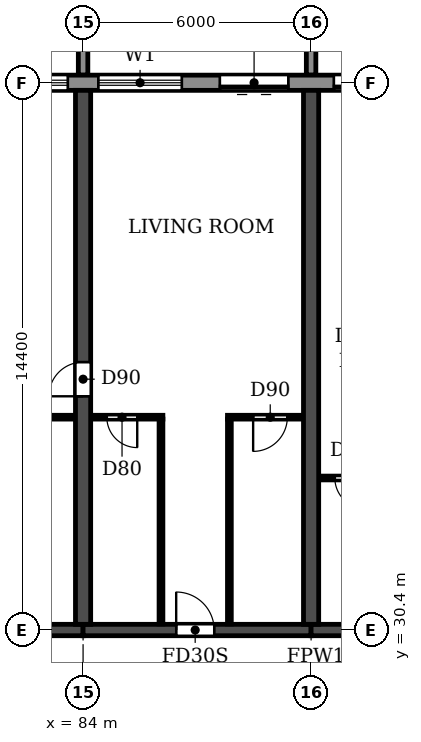
"""IFC4 building model, lengths in metres.
Left out: names, types, materials, properties, quantities, classifications, styles, units other than length and angle.
Written with IfcOpenShell. Run it as: python <this file> out.ifc"""

import sys

from ifc_helpers import new_model, si_unit, direction, frame, frame_2d, origin, place, context, subcontext, project, spatial, polyline, rectangle, outline, extrude, source, transform, mapped, element, fill, save


model = new_model("IFC4")
c1 = context("Model", 3, precision=1e-05, world=origin(), true_north=direction((0.0, 1.0)))
c2 = subcontext(c1, "Body", "Model", "MODEL_VIEW")
j1 = project(units=[si_unit("LENGTHUNIT", "METRE"), si_unit("PLANEANGLEUNIT", "RADIAN")], contexts=[c1])
p1 = place(None, origin())
s1 = spatial("IfcSite", under=j1, at=p1, CompositionType="ELEMENT")
p2 = place(p1, origin())
s2 = spatial("IfcBuilding", under=s1, at=p2, CompositionType="ELEMENT")
p3 = place(p2, frame((0.0, 0.0, 26.7)))
s3 = spatial("IfcBuildingStorey", under=s2, at=p3, CompositionType="ELEMENT", Elevation=26.7)
p4 = place(p3, frame((84.0, 30.55, 0.0), z_axis=(0.0, 0.0, 1.0), x_axis=(0.0, 1.0, 0.0)))
e1 = element("IfcWall", 1, at=p4, inside=s3, PredefinedType="SHEAR", context=c2, shape_type="SweptSolid", body=[
    extrude(rectangle(XDim=14.05, YDim=0.4, at=frame_2d((7.025, 0.0))), origin(), (0.0, 0.0, 1.0), 3.05),
])
p5 = place(p4, frame((6.0, 0.0, 0.0)))
e2 = element("IfcOpeningElement", 2, at=p5, cuts=e1, PredefinedType="OPENING", context=c2, shape_type="SweptSolid", body=[
    extrude(rectangle(XDim=0.9, YDim=2.1, at=frame_2d((0.45, 1.05))), frame((0.0, 0.21, 0.0), z_axis=(0.0, -1.0, 0.0), x_axis=(1.0, 0.0, 0.0)), (0.0, 0.0, 1.0), 0.42),
])
p6 = place(p3, frame((90.0, 30.55, 0.0), z_axis=(0.0, 0.0, 1.0), x_axis=(0.0, 1.0, 0.0)))
e3 = element("IfcWall", 3, at=p6, inside=s3, PredefinedType="SHEAR", context=c2, shape_type="SweptSolid", body=[
    extrude(rectangle(XDim=14.05, YDim=0.4, at=frame_2d((7.025, 0.0))), origin(), (0.0, 0.0, 1.0), 3.05),
])
p7 = place(p3, frame((78.0, 30.4, 0.0), z_axis=(0.0, 0.0, 1.0), x_axis=(1.0, 0.0, 0.0)))
e4 = element("IfcWall", 4, at=p7, inside=s3, PredefinedType="SHEAR", context=c2, shape_type="SweptSolid", body=[
    extrude(rectangle(XDim=6.0, YDim=0.3, at=frame_2d((3.0, 0.0))), origin(), (0.0, 0.0, 1.0), 2.45),
])
p8 = place(p3, frame((84.0, 30.4, 0.0), z_axis=(0.0, 0.0, 1.0), x_axis=(1.0, 0.0, 0.0)))
e5 = element("IfcWall", 5, at=p8, inside=s3, PredefinedType="SHEAR", context=c2, shape_type="SweptSolid", body=[
    extrude(rectangle(XDim=6.0, YDim=0.3, at=frame_2d((3.0, 0.0))), origin(), (0.0, 0.0, 1.0), 2.45),
])
p9 = place(p8, frame((2.45, 0.0, 0.0)))
e6 = element("IfcOpeningElement", 6, at=p9, cuts=e5, PredefinedType="OPENING", context=c2, shape_type="SweptSolid", body=[
    extrude(rectangle(XDim=1.0, YDim=2.1, at=frame_2d((0.5, 1.05))), frame((0.0, 0.16, 0.0), z_axis=(0.0, -1.0, 0.0), x_axis=(1.0, 0.0, 0.0)), (0.0, 0.0, 1.0), 0.32),
])
p10 = place(p3, frame((90.0, 30.4, 0.0), z_axis=(0.0, 0.0, 1.0), x_axis=(1.0, 0.0, 0.0)))
e7 = element("IfcWall", 7, at=p10, inside=s3, PredefinedType="SHEAR", context=c2, shape_type="SweptSolid", body=[
    extrude(rectangle(XDim=6.0, YDim=0.3, at=frame_2d((3.0, 0.0))), origin(), (0.0, 0.0, 1.0), 2.45),
])
p11 = place(p10, frame((2.45, 0.0, 0.0)))
e8 = element("IfcOpeningElement", 8, at=p11, cuts=e7, PredefinedType="OPENING", context=c2, shape_type="SweptSolid", body=[
    extrude(rectangle(XDim=1.0, YDim=2.1, at=frame_2d((0.5, 1.05))), frame((0.0, 0.16, 0.0), z_axis=(0.0, -1.0, 0.0), x_axis=(1.0, 0.0, 0.0)), (0.0, 0.0, 1.0), 0.32),
])
p12 = place(p3, frame((97.317, 44.8, 0.0), z_axis=(0.0, 0.0, 1.0), x_axis=(-1.0, 0.0, 0.0)))
e9 = element("IfcWall", 9, at=p12, inside=s3, PredefinedType="STANDARD", context=c2, shape_type="SweptSolid", body=[
    extrude(rectangle(XDim=92.634, YDim=0.4, at=frame_2d((46.317, 0.0))), origin(), (0.0, 0.0, 1.0), 3.05),
])
p13 = place(p12, frame((88.717, 0.0, 0.9)))
e10 = element("IfcOpeningElement", 10, at=p13, cuts=e9, PredefinedType="OPENING", context=c2, shape_type="SweptSolid", body=[
    extrude(rectangle(XDim=2.2, YDim=1.5, at=frame_2d((1.1, 0.75))), frame((0.0, 0.21, 0.0), z_axis=(0.0, -1.0, 0.0), x_axis=(1.0, 0.0, 0.0)), (0.0, 0.0, 1.0), 0.42),
])
p14 = place(p12, frame((85.917, 0.0, 0.0)))
e11 = element("IfcOpeningElement", 11, at=p14, cuts=e9, PredefinedType="OPENING", context=c2, shape_type="SweptSolid", body=[
    extrude(rectangle(XDim=1.8, YDim=2.4, at=frame_2d((0.9, 1.2))), frame((0.0, 0.21, 0.0), z_axis=(0.0, -1.0, 0.0), x_axis=(1.0, 0.0, 0.0)), (0.0, 0.0, 1.0), 0.42),
])
p15 = place(p12, frame((82.717, 0.0, 0.9)))
e12 = element("IfcOpeningElement", 12, at=p15, cuts=e9, PredefinedType="OPENING", context=c2, shape_type="SweptSolid", body=[
    extrude(rectangle(XDim=2.2, YDim=1.5, at=frame_2d((1.1, 0.75))), frame((0.0, 0.21, 0.0), z_axis=(0.0, -1.0, 0.0), x_axis=(1.0, 0.0, 0.0)), (0.0, 0.0, 1.0), 0.42),
])
p16 = place(p12, frame((79.717, 0.0, 0.9)))
e13 = element("IfcOpeningElement", 13, at=p16, cuts=e9, PredefinedType="OPENING", context=c2, shape_type="SweptSolid", body=[
    extrude(rectangle(XDim=2.2, YDim=1.5, at=frame_2d((1.1, 0.75))), frame((0.0, 0.21, 0.0), z_axis=(0.0, -1.0, 0.0), x_axis=(1.0, 0.0, 0.0)), (0.0, 0.0, 1.0), 0.42),
])
p17 = place(p12, frame((76.917, 0.0, 0.0)))
e14 = element("IfcOpeningElement", 14, at=p17, cuts=e9, PredefinedType="OPENING", context=c2, shape_type="SweptSolid", body=[
    extrude(rectangle(XDim=1.8, YDim=2.4, at=frame_2d((0.9, 1.2))), frame((0.0, 0.21, 0.0), z_axis=(0.0, -1.0, 0.0), x_axis=(1.0, 0.0, 0.0)), (0.0, 0.0, 1.0), 0.42),
])
p18 = place(p12, frame((73.717, 0.0, 0.9)))
e15 = element("IfcOpeningElement", 15, at=p18, cuts=e9, PredefinedType="OPENING", context=c2, shape_type="SweptSolid", body=[
    extrude(rectangle(XDim=2.2, YDim=1.5, at=frame_2d((1.1, 0.75))), frame((0.0, 0.21, 0.0), z_axis=(0.0, -1.0, 0.0), x_axis=(1.0, 0.0, 0.0)), (0.0, 0.0, 1.0), 0.42),
])
p19 = place(p12, frame((70.717, 0.0, 0.9)))
e16 = element("IfcOpeningElement", 16, at=p19, cuts=e9, PredefinedType="OPENING", context=c2, shape_type="SweptSolid", body=[
    extrude(rectangle(XDim=2.2, YDim=1.5, at=frame_2d((1.1, 0.75))), frame((0.0, 0.21, 0.0), z_axis=(0.0, -1.0, 0.0), x_axis=(1.0, 0.0, 0.0)), (0.0, 0.0, 1.0), 0.42),
])
p20 = place(p12, frame((67.717, 0.0, 0.9)))
e17 = element("IfcOpeningElement", 17, at=p20, cuts=e9, PredefinedType="OPENING", context=c2, shape_type="SweptSolid", body=[
    extrude(rectangle(XDim=2.2, YDim=1.5, at=frame_2d((1.1, 0.75))), frame((0.0, 0.21, 0.0), z_axis=(0.0, -1.0, 0.0), x_axis=(1.0, 0.0, 0.0)), (0.0, 0.0, 1.0), 0.42),
])
p21 = place(p12, frame((64.917, 0.0, 0.0)))
e18 = element("IfcOpeningElement", 18, at=p21, cuts=e9, PredefinedType="OPENING", context=c2, shape_type="SweptSolid", body=[
    extrude(rectangle(XDim=1.8, YDim=2.4, at=frame_2d((0.9, 1.2))), frame((0.0, 0.21, 0.0), z_axis=(0.0, -1.0, 0.0), x_axis=(1.0, 0.0, 0.0)), (0.0, 0.0, 1.0), 0.42),
])
p22 = place(p12, frame((61.717, 0.0, 0.9)))
e19 = element("IfcOpeningElement", 19, at=p22, cuts=e9, PredefinedType="OPENING", context=c2, shape_type="SweptSolid", body=[
    extrude(rectangle(XDim=2.2, YDim=1.5, at=frame_2d((1.1, 0.75))), frame((0.0, 0.21, 0.0), z_axis=(0.0, -1.0, 0.0), x_axis=(1.0, 0.0, 0.0)), (0.0, 0.0, 1.0), 0.42),
])
p23 = place(p12, frame((58.717, 0.0, 0.9)))
e20 = element("IfcOpeningElement", 20, at=p23, cuts=e9, PredefinedType="OPENING", context=c2, shape_type="SweptSolid", body=[
    extrude(rectangle(XDim=2.2, YDim=1.5, at=frame_2d((1.1, 0.75))), frame((0.0, 0.21, 0.0), z_axis=(0.0, -1.0, 0.0), x_axis=(1.0, 0.0, 0.0)), (0.0, 0.0, 1.0), 0.42),
])
p24 = place(p12, frame((55.917, 0.0, 0.0)))
e21 = element("IfcOpeningElement", 21, at=p24, cuts=e9, PredefinedType="OPENING", context=c2, shape_type="SweptSolid", body=[
    extrude(rectangle(XDim=1.8, YDim=2.4, at=frame_2d((0.9, 1.2))), frame((0.0, 0.21, 0.0), z_axis=(0.0, -1.0, 0.0), x_axis=(1.0, 0.0, 0.0)), (0.0, 0.0, 1.0), 0.42),
])
p25 = place(p12, frame((52.917, 0.0, 0.0)))
e22 = element("IfcOpeningElement", 22, at=p25, cuts=e9, PredefinedType="OPENING", context=c2, shape_type="SweptSolid", body=[
    extrude(rectangle(XDim=1.8, YDim=2.4, at=frame_2d((0.9, 1.2))), frame((0.0, 0.21, 0.0), z_axis=(0.0, -1.0, 0.0), x_axis=(1.0, 0.0, 0.0)), (0.0, 0.0, 1.0), 0.42),
])
p26 = place(p12, frame((49.717, 0.0, 0.9)))
e23 = element("IfcOpeningElement", 23, at=p26, cuts=e9, PredefinedType="OPENING", context=c2, shape_type="SweptSolid", body=[
    extrude(rectangle(XDim=2.2, YDim=1.5, at=frame_2d((1.1, 0.75))), frame((0.0, 0.21, 0.0), z_axis=(0.0, -1.0, 0.0), x_axis=(1.0, 0.0, 0.0)), (0.0, 0.0, 1.0), 0.42),
])
p27 = place(p12, frame((46.917, 0.0, 0.0)))
e24 = element("IfcOpeningElement", 24, at=p27, cuts=e9, PredefinedType="OPENING", context=c2, shape_type="SweptSolid", body=[
    extrude(rectangle(XDim=1.8, YDim=2.4, at=frame_2d((0.9, 1.2))), frame((0.0, 0.21, 0.0), z_axis=(0.0, -1.0, 0.0), x_axis=(1.0, 0.0, 0.0)), (0.0, 0.0, 1.0), 0.42),
])
p28 = place(p12, frame((43.717, 0.0, 0.9)))
e25 = element("IfcOpeningElement", 25, at=p28, cuts=e9, PredefinedType="OPENING", context=c2, shape_type="SweptSolid", body=[
    extrude(rectangle(XDim=2.2, YDim=1.5, at=frame_2d((1.1, 0.75))), frame((0.0, 0.21, 0.0), z_axis=(0.0, -1.0, 0.0), x_axis=(1.0, 0.0, 0.0)), (0.0, 0.0, 1.0), 0.42),
])
p29 = place(p12, frame((40.717, 0.0, 0.9)))
e26 = element("IfcOpeningElement", 26, at=p29, cuts=e9, PredefinedType="OPENING", context=c2, shape_type="SweptSolid", body=[
    extrude(rectangle(XDim=2.2, YDim=1.5, at=frame_2d((1.1, 0.75))), frame((0.0, 0.21, 0.0), z_axis=(0.0, -1.0, 0.0), x_axis=(1.0, 0.0, 0.0)), (0.0, 0.0, 1.0), 0.42),
])
p30 = place(p12, frame((37.917, 0.0, 0.0)))
e27 = element("IfcOpeningElement", 27, at=p30, cuts=e9, PredefinedType="OPENING", context=c2, shape_type="SweptSolid", body=[
    extrude(rectangle(XDim=1.8, YDim=2.4, at=frame_2d((0.9, 1.2))), frame((0.0, 0.21, 0.0), z_axis=(0.0, -1.0, 0.0), x_axis=(1.0, 0.0, 0.0)), (0.0, 0.0, 1.0), 0.42),
])
p31 = place(p12, frame((34.917, 0.0, 0.0)))
e28 = element("IfcOpeningElement", 28, at=p31, cuts=e9, PredefinedType="OPENING", context=c2, shape_type="SweptSolid", body=[
    extrude(rectangle(XDim=1.8, YDim=2.4, at=frame_2d((0.9, 1.2))), frame((0.0, 0.21, 0.0), z_axis=(0.0, -1.0, 0.0), x_axis=(1.0, 0.0, 0.0)), (0.0, 0.0, 1.0), 0.42),
])
p32 = place(p12, frame((31.717, 0.0, 0.9)))
e29 = element("IfcOpeningElement", 29, at=p32, cuts=e9, PredefinedType="OPENING", context=c2, shape_type="SweptSolid", body=[
    extrude(rectangle(XDim=2.2, YDim=1.5, at=frame_2d((1.1, 0.75))), frame((0.0, 0.21, 0.0), z_axis=(0.0, -1.0, 0.0), x_axis=(1.0, 0.0, 0.0)), (0.0, 0.0, 1.0), 0.42),
])
p33 = place(p12, frame((28.717, 0.0, 0.9)))
e30 = element("IfcOpeningElement", 30, at=p33, cuts=e9, PredefinedType="OPENING", context=c2, shape_type="SweptSolid", body=[
    extrude(rectangle(XDim=2.2, YDim=1.5, at=frame_2d((1.1, 0.75))), frame((0.0, 0.21, 0.0), z_axis=(0.0, -1.0, 0.0), x_axis=(1.0, 0.0, 0.0)), (0.0, 0.0, 1.0), 0.42),
])
p34 = place(p12, frame((25.717, 0.0, 0.9)))
e31 = element("IfcOpeningElement", 31, at=p34, cuts=e9, PredefinedType="OPENING", context=c2, shape_type="SweptSolid", body=[
    extrude(rectangle(XDim=2.2, YDim=1.5, at=frame_2d((1.1, 0.75))), frame((0.0, 0.21, 0.0), z_axis=(0.0, -1.0, 0.0), x_axis=(1.0, 0.0, 0.0)), (0.0, 0.0, 1.0), 0.42),
])
p35 = place(p12, frame((22.717, 0.0, 0.9)))
e32 = element("IfcOpeningElement", 32, at=p35, cuts=e9, PredefinedType="OPENING", context=c2, shape_type="SweptSolid", body=[
    extrude(rectangle(XDim=2.2, YDim=1.5, at=frame_2d((1.1, 0.75))), frame((0.0, 0.21, 0.0), z_axis=(0.0, -1.0, 0.0), x_axis=(1.0, 0.0, 0.0)), (0.0, 0.0, 1.0), 0.42),
])
p36 = place(p12, frame((19.917, 0.0, 0.0)))
e33 = element("IfcOpeningElement", 33, at=p36, cuts=e9, PredefinedType="OPENING", context=c2, shape_type="SweptSolid", body=[
    extrude(rectangle(XDim=1.8, YDim=2.4, at=frame_2d((0.9, 1.2))), frame((0.0, 0.21, 0.0), z_axis=(0.0, -1.0, 0.0), x_axis=(1.0, 0.0, 0.0)), (0.0, 0.0, 1.0), 0.42),
])
p37 = place(p12, frame((16.717, 0.0, 0.9)))
e34 = element("IfcOpeningElement", 34, at=p37, cuts=e9, PredefinedType="OPENING", context=c2, shape_type="SweptSolid", body=[
    extrude(rectangle(XDim=2.2, YDim=1.5, at=frame_2d((1.1, 0.75))), frame((0.0, 0.21, 0.0), z_axis=(0.0, -1.0, 0.0), x_axis=(1.0, 0.0, 0.0)), (0.0, 0.0, 1.0), 0.42),
])
p38 = place(p12, frame((13.717, 0.0, 0.9)))
e35 = element("IfcOpeningElement", 35, at=p38, cuts=e9, PredefinedType="OPENING", context=c2, shape_type="SweptSolid", body=[
    extrude(rectangle(XDim=2.2, YDim=1.5, at=frame_2d((1.1, 0.75))), frame((0.0, 0.21, 0.0), z_axis=(0.0, -1.0, 0.0), x_axis=(1.0, 0.0, 0.0)), (0.0, 0.0, 1.0), 0.42),
])
p39 = place(p12, frame((10.717, 0.0, 0.9)))
e36 = element("IfcOpeningElement", 36, at=p39, cuts=e9, PredefinedType="OPENING", context=c2, shape_type="SweptSolid", body=[
    extrude(rectangle(XDim=2.2, YDim=1.5, at=frame_2d((1.1, 0.75))), frame((0.0, 0.21, 0.0), z_axis=(0.0, -1.0, 0.0), x_axis=(1.0, 0.0, 0.0)), (0.0, 0.0, 1.0), 0.42),
])
p40 = place(p12, frame((7.917, 0.0, 0.0)))
e37 = element("IfcOpeningElement", 37, at=p40, cuts=e9, PredefinedType="OPENING", context=c2, shape_type="SweptSolid", body=[
    extrude(rectangle(XDim=1.8, YDim=2.4, at=frame_2d((0.9, 1.2))), frame((0.0, 0.21, 0.0), z_axis=(0.0, -1.0, 0.0), x_axis=(1.0, 0.0, 0.0)), (0.0, 0.0, 1.0), 0.42),
])
p41 = place(p12, frame((4.917, 0.0, 0.0)))
e38 = element("IfcOpeningElement", 38, at=p41, cuts=e9, PredefinedType="OPENING", context=c2, shape_type="SweptSolid", body=[
    extrude(rectangle(XDim=1.8, YDim=2.4, at=frame_2d((0.9, 1.2))), frame((0.0, 0.21, 0.0), z_axis=(0.0, -1.0, 0.0), x_axis=(1.0, 0.0, 0.0)), (0.0, 0.0, 1.0), 0.42),
])
p42 = place(p12, frame((1.717, 0.0, 0.9)))
e39 = element("IfcOpeningElement", 39, at=p42, cuts=e9, PredefinedType="OPENING", context=c2, shape_type="SweptSolid", body=[
    extrude(rectangle(XDim=2.2, YDim=1.5, at=frame_2d((1.1, 0.75))), frame((0.0, 0.21, 0.0), z_axis=(0.0, -1.0, 0.0), x_axis=(1.0, 0.0, 0.0)), (0.0, 0.0, 1.0), 0.42),
])
m1 = source(origin(), c2, "Body", "SweptSolid", [
    extrude(outline(polyline([(0.0, 0.0), (0.25, 0.0), (0.25, 3.1), (0.0, 3.1), (0.0, 0.0)])), origin(), (0.0, 0.0, 1.0), 3.1),
])
for number, where in (
    (40, (83.875, 45.0, 0.0)),
    (41, (89.875, 45.0, 0.0)),
):
    element("IfcWall", number, at=place(p3, frame(where)), inside=s3, PredefinedType="STANDARD", context=c2, shape_type="MappedRepresentation", body=[
        mapped(m1, transform((0.0, 0.0, 0.0))),
    ])
p43 = place(p3, frame((90.21, 34.4, 0.0), z_axis=(0.0, 0.0, 1.0), x_axis=(1.0, 0.0, 0.0)))
e42 = element("IfcWall", 42, at=p43, inside=s3, PredefinedType="PARTITIONING", context=c2, shape_type="SweptSolid", body=[
    extrude(rectangle(XDim=1.89, YDim=0.1, at=frame_2d((0.945, 0.0))), origin(), (0.0, 0.0, 1.0), 3.05),
])
p44 = place(p43, frame((0.415, 0.0, 0.0)))
e43 = element("IfcOpeningElement", 43, at=p44, cuts=e42, PredefinedType="OPENING", context=c2, shape_type="SweptSolid", body=[
    extrude(rectangle(XDim=0.8, YDim=2.1, at=frame_2d((0.4, 1.05))), frame((0.0, 0.06, 0.0), z_axis=(0.0, -1.0, 0.0), x_axis=(1.0, 0.0, 0.0)), (0.0, 0.0, 1.0), 0.12),
])
p45 = place(p3, frame((81.1, 36.0, 0.0), z_axis=(0.0, 0.0, 1.0), x_axis=(1.0, 0.0, 0.0)))
e44 = element("IfcWall", 44, at=p45, inside=s3, PredefinedType="PARTITIONING", context=c2, shape_type="SweptSolid", body=[
    extrude(rectangle(XDim=2.69, YDim=0.1, at=frame_2d((1.345, 0.0))), origin(), (0.0, 0.0, 1.0), 3.05),
])
p46 = place(p45, frame((1.0, 0.0, 0.0)))
e45 = element("IfcOpeningElement", 45, at=p46, cuts=e44, PredefinedType="OPENING", context=c2, shape_type="SweptSolid", body=[
    extrude(rectangle(XDim=0.8, YDim=2.1, at=frame_2d((0.4, 1.05))), frame((0.0, 0.06, 0.0), z_axis=(0.0, -1.0, 0.0), x_axis=(1.0, 0.0, 0.0)), (0.0, 0.0, 1.0), 0.12),
])
p47 = place(p3, frame((84.21, 36.0, 0.0), z_axis=(0.0, 0.0, 1.0), x_axis=(1.0, 0.0, 0.0)))
e46 = element("IfcWall", 46, at=p47, inside=s3, PredefinedType="PARTITIONING", context=c2, shape_type="SweptSolid", body=[
    extrude(rectangle(XDim=1.89, YDim=0.1, at=frame_2d((0.945, 0.0))), origin(), (0.0, 0.0, 1.0), 3.05),
])
p48 = place(p47, frame((0.415, 0.0, 0.0)))
e47 = element("IfcOpeningElement", 47, at=p48, cuts=e46, PredefinedType="OPENING", context=c2, shape_type="SweptSolid", body=[
    extrude(rectangle(XDim=0.8, YDim=2.1, at=frame_2d((0.4, 1.05))), frame((0.0, 0.06, 0.0), z_axis=(0.0, -1.0, 0.0), x_axis=(1.0, 0.0, 0.0)), (0.0, 0.0, 1.0), 0.12),
])
p49 = place(p3, frame((87.8, 36.0, 0.0), z_axis=(0.0, 0.0, 1.0), x_axis=(1.0, 0.0, 0.0)))
e48 = element("IfcWall", 48, at=p49, inside=s3, PredefinedType="PARTITIONING", context=c2, shape_type="SweptSolid", body=[
    extrude(rectangle(XDim=1.99, YDim=0.1, at=frame_2d((0.995, 0.0))), origin(), (0.0, 0.0, 1.0), 3.05),
])
p50 = place(p49, frame((0.675, 0.0, 0.0)))
e49 = element("IfcOpeningElement", 49, at=p50, cuts=e48, PredefinedType="OPENING", context=c2, shape_type="SweptSolid", body=[
    extrude(rectangle(XDim=0.9, YDim=2.1, at=frame_2d((0.45, 1.05))), frame((0.0, 0.06, 0.0), z_axis=(0.0, -1.0, 0.0), x_axis=(1.0, 0.0, 0.0)), (0.0, 0.0, 1.0), 0.12),
])
for number, where, z_axis, x_axis in (
    (50, (86.05, 30.56, 0.0), (0.0, 0.0, 1.0), (0.0, 1.0, 0.0)),
    (51, (87.85, 30.56, 0.0), (0.0, 0.0, 1.0), (0.0, 1.0, 0.0)),
):
    element("IfcWall", number, at=place(p3, frame(where, z_axis=z_axis, x_axis=x_axis)), inside=s3, PredefinedType="PARTITIONING", context=c2, shape_type="SweptSolid", body=[
        extrude(rectangle(XDim=5.39, YDim=0.1, at=frame_2d((2.695, 0.0))), origin(), (0.0, 0.0, 1.0), 3.05),
    ])
p51 = place(p38, origin())
e52 = element("IfcWindow", 52, at=p51, inside=s3, PartitioningType="DOUBLE_PANEL_HORIZONTAL", PredefinedType="WINDOW", context=c2, shape_type="SweptSolid", body=[
    extrude(rectangle(XDim=2.2, YDim=1.5, at=frame_2d((1.1, 0.75))), frame((0.0, 0.03, 0.0), z_axis=(0.0, -1.0, 0.0), x_axis=(1.0, 0.0, 0.0)), (0.0, 0.0, 1.0), 0.06),
])
fill(e35, e52)
p52 = place(p39, origin())
e53 = element("IfcWindow", 53, at=p52, inside=s3, PartitioningType="DOUBLE_PANEL_HORIZONTAL", PredefinedType="WINDOW", context=c2, shape_type="SweptSolid", body=[
    extrude(rectangle(XDim=2.2, YDim=1.5, at=frame_2d((1.1, 0.75))), frame((0.0, 0.03, 0.0), z_axis=(0.0, -1.0, 0.0), x_axis=(1.0, 0.0, 0.0)), (0.0, 0.0, 1.0), 0.06),
])
fill(e36, e53)
p53 = place(p40, origin())
e54 = element("IfcDoor", 54, at=p53, inside=s3, OperationType="DOUBLE_DOOR_SLIDING", PredefinedType="DOOR", context=c2, shape_type="SweptSolid", body=[
    extrude(rectangle(XDim=1.8, YDim=2.4, at=frame_2d((0.9, 1.2))), frame((0.0, 0.025, 0.0), z_axis=(0.0, -1.0, 0.0), x_axis=(1.0, 0.0, 0.0)), (0.0, 0.0, 1.0), 0.05),
])
fill(e37, e54)
p54 = place(p41, origin())
e55 = element("IfcDoor", 55, at=p54, inside=s3, OperationType="DOUBLE_DOOR_SLIDING", PredefinedType="DOOR", context=c2, shape_type="SweptSolid", body=[
    extrude(rectangle(XDim=1.8, YDim=2.4, at=frame_2d((0.9, 1.2))), frame((0.0, 0.025, 0.0), z_axis=(0.0, -1.0, 0.0), x_axis=(1.0, 0.0, 0.0)), (0.0, 0.0, 1.0), 0.05),
])
fill(e38, e55)
p55 = place(p5, origin())
e56 = element("IfcDoor", 56, at=p55, inside=s3, OperationType="SINGLE_SWING_LEFT", PredefinedType="DOOR", context=c2, shape_type="SweptSolid", body=[
    extrude(rectangle(XDim=0.9, YDim=2.1, at=frame_2d((0.45, 1.05))), frame((0.0, 0.025, 0.0), z_axis=(0.0, -1.0, 0.0), x_axis=(1.0, 0.0, 0.0)), (0.0, 0.0, 1.0), 0.05),
])
fill(e2, e56)
p56 = place(p48, frame((0.8, 0.0, 0.0), z_axis=(0.0, 0.0, 1.0), x_axis=(-1.0, 0.0, 0.0)))
e57 = element("IfcDoor", 57, at=p56, inside=s3, OperationType="SINGLE_SWING_LEFT", PredefinedType="DOOR", context=c2, shape_type="SweptSolid", body=[
    extrude(rectangle(XDim=0.8, YDim=2.1, at=frame_2d((0.4, 1.05))), frame((0.0, 0.025, 0.0), z_axis=(0.0, -1.0, 0.0), x_axis=(1.0, 0.0, 0.0)), (0.0, 0.0, 1.0), 0.05),
])
fill(e47, e57)
p57 = place(p9, origin())
e58 = element("IfcDoor", 58, at=p57, inside=s3, OperationType="SINGLE_SWING_LEFT", PredefinedType="DOOR", context=c2, shape_type="SweptSolid", body=[
    extrude(rectangle(XDim=1.0, YDim=2.1, at=frame_2d((0.5, 1.05))), frame((0.0, 0.025, 0.0), z_axis=(0.0, -1.0, 0.0), x_axis=(1.0, 0.0, 0.0)), (0.0, 0.0, 1.0), 0.05),
])
fill(e6, e58)
p58 = place(p50, frame((0.9, 0.0, 0.0), z_axis=(0.0, 0.0, 1.0), x_axis=(-1.0, 0.0, 0.0)))
e59 = element("IfcDoor", 59, at=p58, inside=s3, OperationType="SINGLE_SWING_RIGHT", PredefinedType="DOOR", context=c2, shape_type="SweptSolid", body=[
    extrude(rectangle(XDim=0.9, YDim=2.1, at=frame_2d((0.45, 1.05))), frame((0.0, 0.025, 0.0), z_axis=(0.0, -1.0, 0.0), x_axis=(1.0, 0.0, 0.0)), (0.0, 0.0, 1.0), 0.05),
])
fill(e49, e59)
p59 = place(p44, frame((0.8, 0.0, 0.0), z_axis=(0.0, 0.0, 1.0), x_axis=(-1.0, 0.0, 0.0)))
e60 = element("IfcDoor", 60, at=p59, inside=s3, OperationType="SINGLE_SWING_LEFT", PredefinedType="DOOR", context=c2, shape_type="SweptSolid", body=[
    extrude(rectangle(XDim=0.8, YDim=2.1, at=frame_2d((0.4, 1.05))), frame((0.0, 0.025, 0.0), z_axis=(0.0, -1.0, 0.0), x_axis=(1.0, 0.0, 0.0)), (0.0, 0.0, 1.0), 0.05),
])
fill(e43, e60)
save(model, sys.argv[1])
